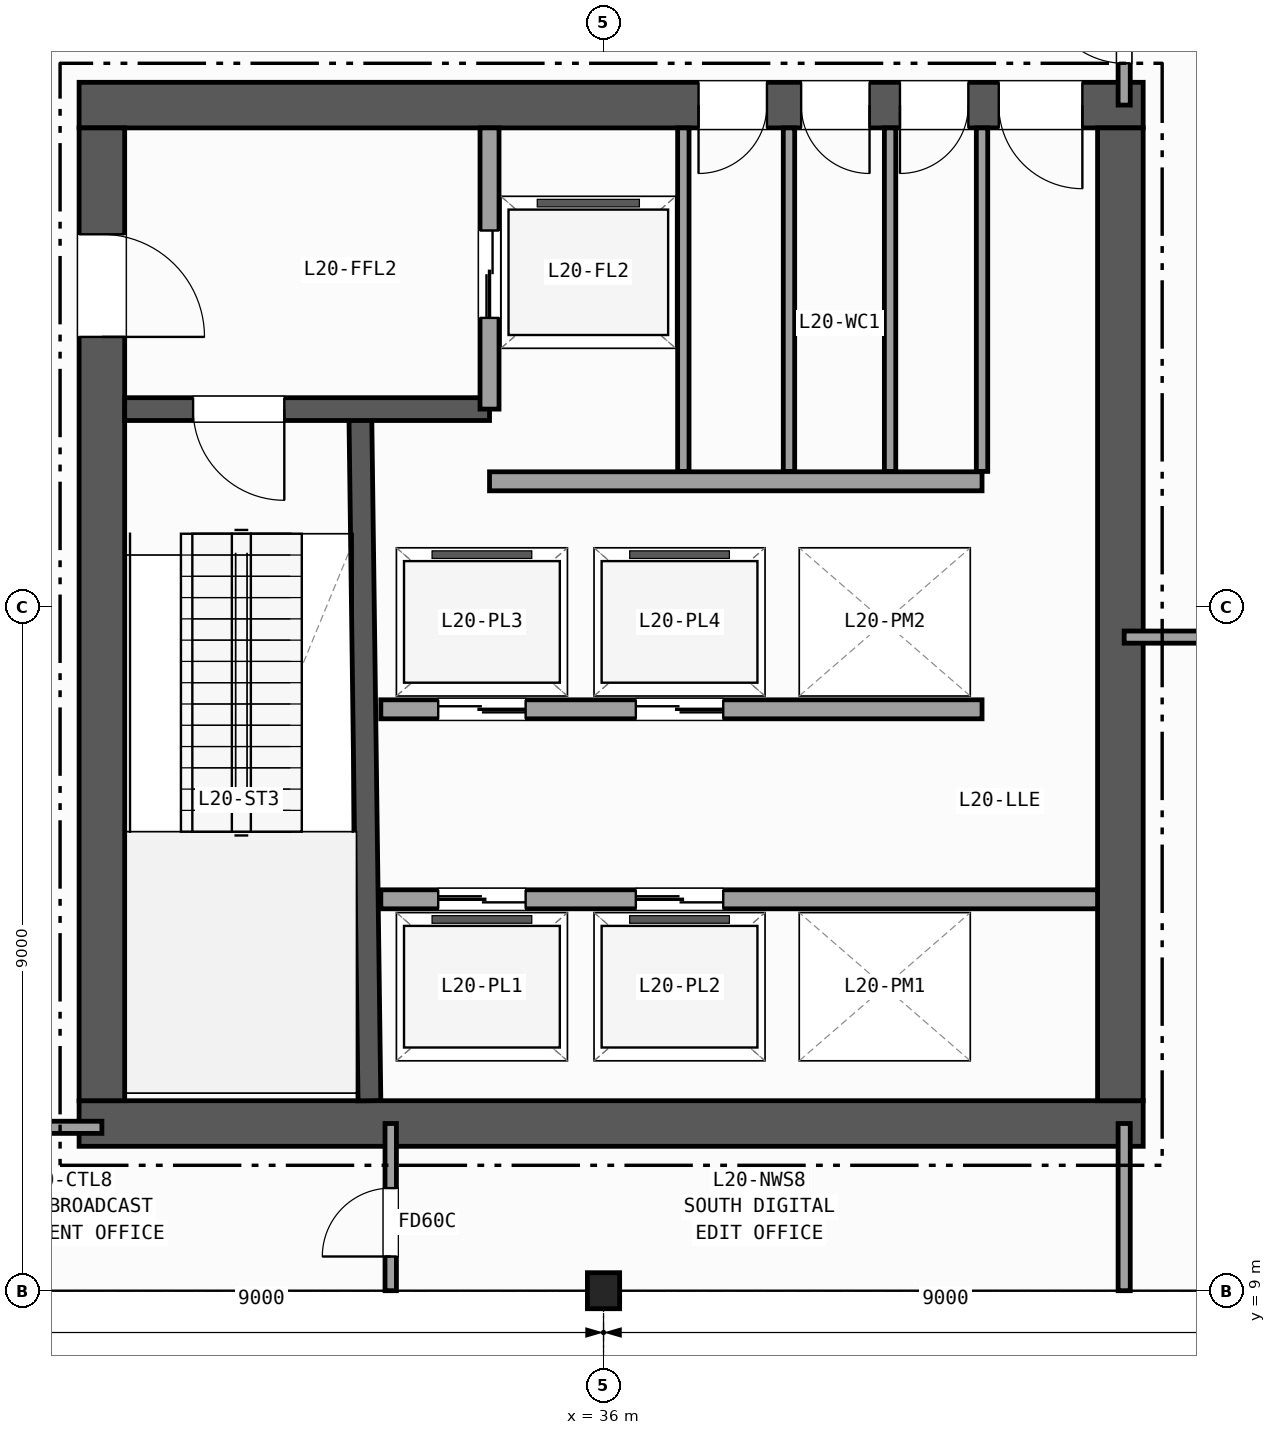
"""IFC4 building model, lengths in metres.
Left out: names, types, materials, properties, quantities, classifications, styles, units other than length and angle.
Written with IfcOpenShell. Run it as: python <this file> out.ifc"""

import sys

from ifc_helpers import new_model, si_unit, direction, frame, frame_2d, origin, origin_2d, place, context, subcontext, project, spatial, rectangle, i_section, extrude, element, fill, save


model = new_model("IFC4")
c1 = context("Model", 3, precision=1e-05, world=origin(), true_north=direction((0.0, 1.0)))
c2 = subcontext(c1, "Body", "Model", "MODEL_VIEW")
j1 = project(units=[si_unit("LENGTHUNIT", "METRE"), si_unit("PLANEANGLEUNIT", "RADIAN")], contexts=[c1])
p1 = place(None, origin())
s1 = spatial("IfcSite", under=j1, at=p1, CompositionType="ELEMENT")
p2 = place(p1, origin())
s2 = spatial("IfcBuilding", under=s1, at=p2, CompositionType="ELEMENT")
p3 = place(p2, frame((0.0, 0.0, 84.1)))
s3 = spatial("IfcBuildingStorey", under=s2, at=p3, CompositionType="ELEMENT", Elevation=84.1)
p4 = place(p3, frame((36.0, 9.0, 0.0), z_axis=(0.0, 0.0, 1.0), x_axis=(1.0, 0.0, 0.0)))
e1 = element("IfcColumn", 1, at=p4, inside=s3, PredefinedType="COLUMN", context=c2, shape_type="SweptSolid", body=[
    extrude(i_section(OverallWidth=0.424, OverallDepth=0.474, WebThickness=0.048, FlangeThickness=0.077, FilletRadius=0.015, at=origin_2d()), origin(), (0.0, 0.0, 1.0), 5.0),
])
p5 = place(p3, frame((29.1, 11.2, 0.0), z_axis=(0.0, 0.0, 1.0), x_axis=(1.0, 0.0, 0.0)))
e2 = element("IfcWall", 2, at=p5, inside=s3, PredefinedType="SHEAR", context=c2, shape_type="SweptSolid", body=[
    extrude(rectangle(XDim=14.0, YDim=0.6, at=frame_2d((7.0, 0.0))), origin(), (0.0, 0.0, 1.0), 4.72),
])
p6 = place(p3, frame((43.1, 24.6, 0.0), z_axis=(0.0, 0.0, 1.0), x_axis=(-1.0, 0.0, 0.0)))
e3 = element("IfcWall", 3, at=p6, inside=s3, PredefinedType="SHEAR", context=c2, shape_type="SweptSolid", body=[
    extrude(rectangle(XDim=14.0, YDim=0.6, at=frame_2d((7.0, 0.0))), origin(), (0.0, 0.0, 1.0), 4.72),
])
p7 = place(p6, frame((0.8, 0.0, 0.0)))
e4 = element("IfcOpeningElement", 4, at=p7, cuts=e3, PredefinedType="OPENING", context=c2, shape_type="SweptSolid", body=[
    extrude(rectangle(XDim=1.1, YDim=2.15, at=frame_2d((0.55, 1.075))), frame((0.0, 0.31, 0.0), z_axis=(0.0, -1.0, 0.0), x_axis=(1.0, 0.0, 0.0)), (0.0, 0.0, 1.0), 0.62),
])
p8 = place(p6, frame((2.3, 0.0, 0.0)))
e5 = element("IfcOpeningElement", 5, at=p8, cuts=e3, PredefinedType="OPENING", context=c2, shape_type="SweptSolid", body=[
    extrude(rectangle(XDim=0.9, YDim=2.1, at=frame_2d((0.45, 1.05))), frame((0.0, 0.31, 0.0), z_axis=(0.0, -1.0, 0.0), x_axis=(1.0, 0.0, 0.0)), (0.0, 0.0, 1.0), 0.62),
])
p9 = place(p6, frame((3.6, 0.0, 0.0)))
e6 = element("IfcOpeningElement", 6, at=p9, cuts=e3, PredefinedType="OPENING", context=c2, shape_type="SweptSolid", body=[
    extrude(rectangle(XDim=0.9, YDim=2.1, at=frame_2d((0.45, 1.05))), frame((0.0, 0.31, 0.0), z_axis=(0.0, -1.0, 0.0), x_axis=(1.0, 0.0, 0.0)), (0.0, 0.0, 1.0), 0.62),
])
p10 = place(p6, frame((4.95, 0.0, 0.0)))
e7 = element("IfcOpeningElement", 7, at=p10, cuts=e3, PredefinedType="OPENING", context=c2, shape_type="SweptSolid", body=[
    extrude(rectangle(XDim=0.9, YDim=2.1, at=frame_2d((0.45, 1.05))), frame((0.0, 0.31, 0.0), z_axis=(0.0, -1.0, 0.0), x_axis=(1.0, 0.0, 0.0)), (0.0, 0.0, 1.0), 0.62),
])
p11 = place(p3, frame((29.4, 24.3, 0.0), z_axis=(0.0, 0.0, 1.0), x_axis=(0.0, -1.0, 0.0)))
e8 = element("IfcWall", 8, at=p11, inside=s3, PredefinedType="SHEAR", context=c2, shape_type="SweptSolid", body=[
    extrude(rectangle(XDim=12.8, YDim=0.6, at=frame_2d((6.4, 0.0))), origin(), (0.0, 0.0, 1.0), 4.72),
])
p12 = place(p11, frame((1.4, 0.0, 0.0)))
e9 = element("IfcOpeningElement", 9, at=p12, cuts=e8, PredefinedType="OPENING", context=c2, shape_type="SweptSolid", body=[
    extrude(rectangle(XDim=1.35, YDim=2.15, at=frame_2d((0.675, 1.075))), frame((0.0, 0.31, 0.0), z_axis=(0.0, -1.0, 0.0), x_axis=(1.0, 0.0, 0.0)), (0.0, 0.0, 1.0), 0.62),
])
p13 = place(p3, frame((42.8, 11.5, 0.0), z_axis=(0.0, 0.0, 1.0), x_axis=(0.0, 1.0, 0.0)))
e10 = element("IfcWall", 10, at=p13, inside=s3, PredefinedType="SHEAR", context=c2, shape_type="SweptSolid", body=[
    extrude(rectangle(XDim=12.8, YDim=0.6, at=frame_2d((6.4, 0.0))), origin(), (0.0, 0.0, 1.0), 4.72),
])
p14 = place(p3, frame((32.92, 11.5, 0.0), z_axis=(0.0, 0.0, 1.0), x_axis=(-0.013244407292, 0.999912288991, 0.0)))
e11 = element("IfcWall", 11, at=p14, inside=s3, PredefinedType="SHEAR", context=c2, shape_type="SweptSolid", body=[
    extrude(rectangle(XDim=9.051, YDim=0.3, at=frame_2d((4.525, 0.0))), origin(), (0.0, 0.0, 1.0), 4.72),
])
p15 = place(p3, frame((34.5, 20.6, 0.0), z_axis=(0.0, 0.0, 1.0), x_axis=(-1.0, 0.0, 0.0)))
e12 = element("IfcWall", 12, at=p15, inside=s3, PredefinedType="SHEAR", context=c2, shape_type="SweptSolid", body=[
    extrude(rectangle(XDim=4.8, YDim=0.3, at=frame_2d((2.4, 0.0))), origin(), (0.0, 0.0, 1.0), 4.72),
])
p16 = place(p15, frame((2.7, 0.0, 0.0)))
e13 = element("IfcOpeningElement", 13, at=p16, cuts=e12, PredefinedType="OPENING", context=c2, shape_type="SweptSolid", body=[
    extrude(rectangle(XDim=1.2, YDim=2.15, at=frame_2d((0.6, 1.075))), frame((0.0, 0.16, 0.0), z_axis=(0.0, -1.0, 0.0), x_axis=(1.0, 0.0, 0.0)), (0.0, 0.0, 1.0), 0.32),
])
p17 = place(p3, frame((34.5, 20.6, 0.0), z_axis=(0.0, 0.0, 1.0), x_axis=(0.0, 1.0, 0.0)))
e14 = element("IfcWall", 14, at=p17, inside=s3, PredefinedType="PARTITIONING", context=c2, shape_type="SweptSolid", body=[
    extrude(rectangle(XDim=3.7, YDim=0.25, at=frame_2d((1.85, 0.0))), origin(), (0.0, 0.0, 1.0), 4.72),
])
p18 = place(p17, frame((1.2, 0.0, 0.0)))
e15 = element("IfcOpeningElement", 15, at=p18, cuts=e14, PredefinedType="OPENING", context=c2, shape_type="SweptSolid", body=[
    extrude(rectangle(XDim=1.15, YDim=2.15, at=frame_2d((0.575, 1.075))), frame((0.0, 0.135, 0.0), z_axis=(0.0, -1.0, 0.0), x_axis=(1.0, 0.0, 0.0)), (0.0, 0.0, 1.0), 0.27),
])
p19 = place(p3, frame((34.5, 19.65, 0.0), z_axis=(0.0, 0.0, 1.0), x_axis=(1.0, 0.0, 0.0)))
e16 = element("IfcWall", 16, at=p19, inside=s3, PredefinedType="PARTITIONING", context=c2, shape_type="SweptSolid", body=[
    extrude(rectangle(XDim=6.48, YDim=0.25, at=frame_2d((3.24, 0.0))), origin(), (0.0, 0.0, 1.0), 4.72),
])
p20 = place(p3, frame((33.07, 14.15, 0.0), z_axis=(0.0, 0.0, 1.0), x_axis=(1.0, 0.0, 0.0)))
e17 = element("IfcWall", 17, at=p20, inside=s3, PredefinedType="PARTITIONING", context=c2, shape_type="SweptSolid", body=[
    extrude(rectangle(XDim=9.43, YDim=0.25, at=frame_2d((4.715, 0.0))), origin(), (0.0, 0.0, 1.0), 4.72),
])
p21 = place(p20, frame((0.755, 0.0, 0.0)))
e18 = element("IfcOpeningElement", 18, at=p21, cuts=e17, PredefinedType="OPENING", context=c2, shape_type="SweptSolid", body=[
    extrude(rectangle(XDim=1.15, YDim=2.15, at=frame_2d((0.575, 1.075))), frame((0.0, 0.135, 0.0), z_axis=(0.0, -1.0, 0.0), x_axis=(1.0, 0.0, 0.0)), (0.0, 0.0, 1.0), 0.27),
])
p22 = place(p20, frame((3.355, 0.0, 0.0)))
e19 = element("IfcOpeningElement", 19, at=p22, cuts=e17, PredefinedType="OPENING", context=c2, shape_type="SweptSolid", body=[
    extrude(rectangle(XDim=1.15, YDim=2.15, at=frame_2d((0.575, 1.075))), frame((0.0, 0.135, 0.0), z_axis=(0.0, -1.0, 0.0), x_axis=(1.0, 0.0, 0.0)), (0.0, 0.0, 1.0), 0.27),
])
p23 = place(p3, frame((40.98, 16.65, 0.0), z_axis=(0.0, 0.0, 1.0), x_axis=(-1.0, 0.0, 0.0)))
e20 = element("IfcWall", 20, at=p23, inside=s3, PredefinedType="PARTITIONING", context=c2, shape_type="SweptSolid", body=[
    extrude(rectangle(XDim=7.91, YDim=0.25, at=frame_2d((3.955, 0.0))), origin(), (0.0, 0.0, 1.0), 4.72),
])
p24 = place(p23, frame((6.005, 0.0, 0.0)))
e21 = element("IfcOpeningElement", 21, at=p24, cuts=e20, PredefinedType="OPENING", context=c2, shape_type="SweptSolid", body=[
    extrude(rectangle(XDim=1.15, YDim=2.15, at=frame_2d((0.575, 1.075))), frame((0.0, 0.135, 0.0), z_axis=(0.0, -1.0, 0.0), x_axis=(1.0, 0.0, 0.0)), (0.0, 0.0, 1.0), 0.27),
])
p25 = place(p23, frame((3.405, 0.0, 0.0)))
e22 = element("IfcOpeningElement", 22, at=p25, cuts=e20, PredefinedType="OPENING", context=c2, shape_type="SweptSolid", body=[
    extrude(rectangle(XDim=1.15, YDim=2.15, at=frame_2d((0.575, 1.075))), frame((0.0, 0.135, 0.0), z_axis=(0.0, -1.0, 0.0), x_axis=(1.0, 0.0, 0.0)), (0.0, 0.0, 1.0), 0.27),
])
for number, where, z_axis, x_axis in (
    (23, (37.05, 19.78, 0.0), (0.0, 0.0, 1.0), (0.0, 1.0, 0.0)),
    (24, (38.44, 19.78, 0.0), (0.0, 0.0, 1.0), (0.0, 1.0, 0.0)),
    (25, (39.77, 19.78, 0.0), (0.0, 0.0, 1.0), (0.0, 1.0, 0.0)),
    (26, (40.98, 19.78, 0.0), (0.0, 0.0, 1.0), (0.0, 1.0, 0.0)),
):
    element("IfcWall", number, at=place(p3, frame(where, z_axis=z_axis, x_axis=x_axis)), inside=s3, PredefinedType="PARTITIONING", context=c2, shape_type="SweptSolid", body=[
        extrude(rectangle(XDim=4.52, YDim=0.15, at=frame_2d((2.26, 0.0))), origin(), (0.0, 0.0, 1.0), 4.72),
    ])
p26 = place(p3, frame((24.65, 11.15, 0.0), z_axis=(0.0, 0.0, 1.0), x_axis=(1.0, 0.0, 0.0)))
e27 = element("IfcWall", 27, at=p26, inside=s3, PredefinedType="PARTITIONING", context=c2, shape_type="SweptSolid", body=[
    extrude(rectangle(XDim=4.75, YDim=0.16, at=frame_2d((2.375, 0.0))), origin(), (0.0, 0.0, 1.0), 4.092),
])
p27 = place(p26, frame((1.2, 0.0, 0.0)))
e28 = element("IfcOpeningElement", 28, at=p27, cuts=e27, PredefinedType="OPENING", context=c2, shape_type="SweptSolid", body=[
    extrude(rectangle(XDim=0.95, YDim=2.1, at=frame_2d((0.475, 1.05))), frame((0.0, 0.09, 0.0), z_axis=(0.0, -1.0, 0.0), x_axis=(1.0, 0.0, 0.0)), (0.0, 0.0, 1.0), 0.18),
])
p28 = place(p3, frame((33.2, 9.0, 0.0), z_axis=(0.0, 0.0, 1.0), x_axis=(0.0, 1.0, 0.0)))
e29 = element("IfcWall", 29, at=p28, inside=s3, PredefinedType="PARTITIONING", context=c2, shape_type="SweptSolid", body=[
    extrude(rectangle(XDim=2.2, YDim=0.15, at=frame_2d((1.1, 0.0))), origin(), (0.0, 0.0, 1.0), 3.927),
])
p29 = place(p28, frame((0.45, 0.0, 0.0)))
e30 = element("IfcOpeningElement", 30, at=p29, cuts=e29, PredefinedType="OPENING", context=c2, shape_type="SweptSolid", body=[
    extrude(rectangle(XDim=0.9, YDim=2.1, at=frame_2d((0.45, 1.05))), frame((0.0, 0.085, 0.0), z_axis=(0.0, -1.0, 0.0), x_axis=(1.0, 0.0, 0.0)), (0.0, 0.0, 1.0), 0.17),
])
p30 = place(p3, frame((42.85, 9.0, 0.0), z_axis=(0.0, 0.0, 1.0), x_axis=(0.0, 1.0, 0.0)))
e31 = element("IfcWall", 31, at=p30, inside=s3, PredefinedType="PARTITIONING", context=c2, shape_type="SweptSolid", body=[
    extrude(rectangle(XDim=2.2, YDim=0.16, at=frame_2d((1.1, 0.0))), origin(), (0.0, 0.0, 1.0), 3.927),
])
p31 = place(p3, frame((42.85, 24.6, 0.0), z_axis=(0.0, 0.0, 1.0), x_axis=(0.0, 1.0, 0.0)))
e32 = element("IfcWall", 32, at=p31, inside=s3, PredefinedType="PARTITIONING", context=c2, shape_type="SweptSolid", body=[
    extrude(rectangle(XDim=2.4, YDim=0.16, at=frame_2d((1.2, 0.0))), origin(), (0.0, 0.0, 1.0), 3.927),
])
p32 = place(p31, frame((0.55, 0.0, 0.0)))
e33 = element("IfcOpeningElement", 33, at=p32, cuts=e32, PredefinedType="OPENING", context=c2, shape_type="SweptSolid", body=[
    extrude(rectangle(XDim=1.05, YDim=2.15, at=frame_2d((0.525, 1.075))), frame((0.0, 0.09, 0.0), z_axis=(0.0, -1.0, 0.0), x_axis=(1.0, 0.0, 0.0)), (0.0, 0.0, 1.0), 0.18),
])
p33 = place(p3, frame((42.85, 17.6, 0.0), z_axis=(0.0, 0.0, 1.0), x_axis=(1.0, 0.0, 0.0)))
e34 = element("IfcWall", 34, at=p33, inside=s3, PredefinedType="PARTITIONING", context=c2, shape_type="SweptSolid", body=[
    extrude(rectangle(XDim=20.809, YDim=0.16, at=frame_2d((10.404, 0.0))), origin(), (0.0, 0.0, 1.0), 4.092),
])
p34 = place(p33, frame((2.95, 0.0, 0.0)))
e35 = element("IfcOpeningElement", 35, at=p34, cuts=e34, PredefinedType="OPENING", context=c2, shape_type="SweptSolid", body=[
    extrude(rectangle(XDim=1.2, YDim=2.15, at=frame_2d((0.6, 1.075))), frame((0.0, 0.09, 0.0), z_axis=(0.0, -1.0, 0.0), x_axis=(1.0, 0.0, 0.0)), (0.0, 0.0, 1.0), 0.18),
])
p35 = place(p16, origin())
e36 = element("IfcDoor", 36, at=p35, inside=s3, OperationType="SINGLE_SWING_LEFT", PredefinedType="DOOR", context=c2, shape_type="SweptSolid", body=[
    extrude(rectangle(XDim=1.2, YDim=2.15, at=frame_2d((0.6, 1.075))), frame((0.0, 0.025, 0.0), z_axis=(0.0, -1.0, 0.0), x_axis=(1.0, 0.0, 0.0)), (0.0, 0.0, 1.0), 0.05),
])
fill(e13, e36)
p36 = place(p12, origin())
e37 = element("IfcDoor", 37, at=p36, inside=s3, OperationType="SINGLE_SWING_RIGHT", PredefinedType="DOOR", context=c2, shape_type="SweptSolid", body=[
    extrude(rectangle(XDim=1.35, YDim=2.15, at=frame_2d((0.675, 1.075))), frame((0.0, 0.025, 0.0), z_axis=(0.0, -1.0, 0.0), x_axis=(1.0, 0.0, 0.0)), (0.0, 0.0, 1.0), 0.05),
])
fill(e9, e37)
p37 = place(p7, origin())
e38 = element("IfcDoor", 38, at=p37, inside=s3, OperationType="SINGLE_SWING_LEFT", PredefinedType="DOOR", context=c2, shape_type="SweptSolid", body=[
    extrude(rectangle(XDim=1.1, YDim=2.15, at=frame_2d((0.55, 1.075))), frame((0.0, 0.025, 0.0), z_axis=(0.0, -1.0, 0.0), x_axis=(1.0, 0.0, 0.0)), (0.0, 0.0, 1.0), 0.05),
])
fill(e4, e38)
p38 = place(p8, origin())
e39 = element("IfcDoor", 39, at=p38, inside=s3, OperationType="SINGLE_SWING_RIGHT", PredefinedType="DOOR", context=c2, shape_type="SweptSolid", body=[
    extrude(rectangle(XDim=0.9, YDim=2.1, at=frame_2d((0.45, 1.05))), frame((0.0, 0.025, 0.0), z_axis=(0.0, -1.0, 0.0), x_axis=(1.0, 0.0, 0.0)), (0.0, 0.0, 1.0), 0.05),
])
fill(e5, e39)
p39 = place(p9, origin())
e40 = element("IfcDoor", 40, at=p39, inside=s3, OperationType="SINGLE_SWING_LEFT", PredefinedType="DOOR", context=c2, shape_type="SweptSolid", body=[
    extrude(rectangle(XDim=0.9, YDim=2.1, at=frame_2d((0.45, 1.05))), frame((0.0, 0.025, 0.0), z_axis=(0.0, -1.0, 0.0), x_axis=(1.0, 0.0, 0.0)), (0.0, 0.0, 1.0), 0.05),
])
fill(e6, e40)
p40 = place(p10, origin())
e41 = element("IfcDoor", 41, at=p40, inside=s3, OperationType="SINGLE_SWING_RIGHT", PredefinedType="DOOR", context=c2, shape_type="SweptSolid", body=[
    extrude(rectangle(XDim=0.9, YDim=2.1, at=frame_2d((0.45, 1.05))), frame((0.0, 0.025, 0.0), z_axis=(0.0, -1.0, 0.0), x_axis=(1.0, 0.0, 0.0)), (0.0, 0.0, 1.0), 0.05),
])
fill(e7, e41)
p41 = place(p18, origin())
e42 = element("IfcDoor", 42, at=p41, inside=s3, OperationType="DOUBLE_DOOR_SLIDING", PredefinedType="DOOR", context=c2, shape_type="SweptSolid", body=[
    extrude(rectangle(XDim=1.15, YDim=2.15, at=frame_2d((0.575, 1.075))), frame((0.0, 0.025, 0.0), z_axis=(0.0, -1.0, 0.0), x_axis=(1.0, 0.0, 0.0)), (0.0, 0.0, 1.0), 0.05),
])
fill(e15, e42)
p42 = place(p21, origin())
e43 = element("IfcDoor", 43, at=p42, inside=s3, OperationType="DOUBLE_DOOR_SLIDING", PredefinedType="DOOR", context=c2, shape_type="SweptSolid", body=[
    extrude(rectangle(XDim=1.15, YDim=2.15, at=frame_2d((0.575, 1.075))), frame((0.0, 0.025, 0.0), z_axis=(0.0, -1.0, 0.0), x_axis=(1.0, 0.0, 0.0)), (0.0, 0.0, 1.0), 0.05),
])
fill(e18, e43)
p43 = place(p22, origin())
e44 = element("IfcDoor", 44, at=p43, inside=s3, OperationType="DOUBLE_DOOR_SLIDING", PredefinedType="DOOR", context=c2, shape_type="SweptSolid", body=[
    extrude(rectangle(XDim=1.15, YDim=2.15, at=frame_2d((0.575, 1.075))), frame((0.0, 0.025, 0.0), z_axis=(0.0, -1.0, 0.0), x_axis=(1.0, 0.0, 0.0)), (0.0, 0.0, 1.0), 0.05),
])
fill(e19, e44)
p44 = place(p24, origin())
e45 = element("IfcDoor", 45, at=p44, inside=s3, OperationType="DOUBLE_DOOR_SLIDING", PredefinedType="DOOR", context=c2, shape_type="SweptSolid", body=[
    extrude(rectangle(XDim=1.15, YDim=2.15, at=frame_2d((0.575, 1.075))), frame((0.0, 0.025, 0.0), z_axis=(0.0, -1.0, 0.0), x_axis=(1.0, 0.0, 0.0)), (0.0, 0.0, 1.0), 0.05),
])
fill(e21, e45)
p45 = place(p25, origin())
e46 = element("IfcDoor", 46, at=p45, inside=s3, OperationType="DOUBLE_DOOR_SLIDING", PredefinedType="DOOR", context=c2, shape_type="SweptSolid", body=[
    extrude(rectangle(XDim=1.15, YDim=2.15, at=frame_2d((0.575, 1.075))), frame((0.0, 0.025, 0.0), z_axis=(0.0, -1.0, 0.0), x_axis=(1.0, 0.0, 0.0)), (0.0, 0.0, 1.0), 0.05),
])
fill(e22, e46)
p46 = place(p29, origin())
e47 = element("IfcDoor", 47, at=p46, inside=s3, OperationType="SINGLE_SWING_LEFT", PredefinedType="DOOR", context=c2, shape_type="SweptSolid", body=[
    extrude(rectangle(XDim=0.9, YDim=2.1, at=frame_2d((0.45, 1.05))), frame((0.0, 0.025, 0.0), z_axis=(0.0, -1.0, 0.0), x_axis=(1.0, 0.0, 0.0)), (0.0, 0.0, 1.0), 0.05),
])
fill(e30, e47)
p47 = place(p32, origin())
e48 = element("IfcDoor", 48, at=p47, inside=s3, OperationType="SINGLE_SWING_RIGHT", PredefinedType="DOOR", context=c2, shape_type="SweptSolid", body=[
    extrude(rectangle(XDim=1.05, YDim=2.15, at=frame_2d((0.525, 1.075))), frame((0.0, 0.025, 0.0), z_axis=(0.0, -1.0, 0.0), x_axis=(1.0, 0.0, 0.0)), (0.0, 0.0, 1.0), 0.05),
])
fill(e33, e48)
save(model, sys.argv[1])
